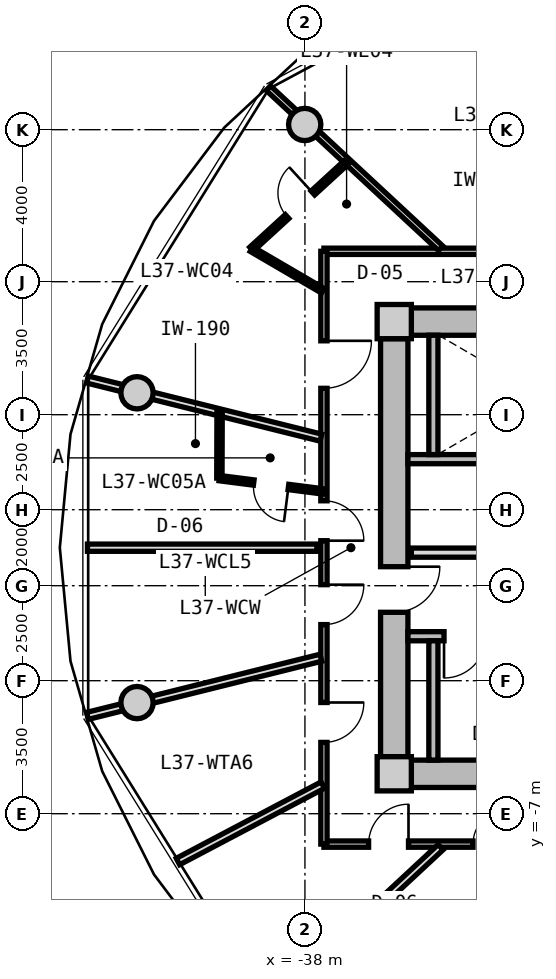
"""IFC4 building model, lengths in metres.
Left out: names, types, materials, properties, quantities, classifications, styles, units other than length and angle.
Written with IfcOpenShell. Run it as: python <this file> out.ifc"""

import sys

from ifc_helpers import new_model, si_unit, direction, frame, frame_2d, origin, origin_2d, place, context, subcontext, project, spatial, rectangle, circle, extrude, source, transform, mapped, element, fill, save


model = new_model("IFC4")
c1 = context("Model", 3, precision=1e-05, world=origin(), true_north=direction((0.0, 1.0)))
c2 = subcontext(c1, "Body", "Model", "MODEL_VIEW")
j1 = project(units=[si_unit("LENGTHUNIT", "METRE"), si_unit("PLANEANGLEUNIT", "RADIAN")], contexts=[c1])
p1 = place(None, origin())
s1 = spatial("IfcSite", under=j1, at=p1, CompositionType="ELEMENT")
p2 = place(p1, origin())
s2 = spatial("IfcBuilding", under=s1, at=p2, CompositionType="ELEMENT")
p3 = place(p2, frame((0.0, 0.0, 120.65)))
s3 = spatial("IfcBuildingStorey", under=s2, at=p3, CompositionType="ELEMENT", Elevation=120.65)
m1 = source(origin(), c2, "Body", "SweptSolid", [
    extrude(rectangle(XDim=0.9, YDim=0.9, at=origin_2d()), origin(), (0.0, 0.0, 1.0), 3.05),
])
for number, where, z_axis, x_axis in (
    (1, (-35.65, -5.95, 0.0), (0.0, 0.0, 1.0), (1.0, 0.0, 0.0)),
    (2, (-35.65, 5.95, 0.0), (0.0, 0.0, 1.0), (1.0, 0.0, 0.0)),
):
    element("IfcColumn", number, at=place(p3, frame(where, z_axis=z_axis, x_axis=x_axis)), inside=s3, PredefinedType="COLUMN", context=c2, shape_type="MappedRepresentation", body=[
        mapped(m1, transform((0.0, 0.0, 0.0), x_axis=(1.0, 0.0, 0.0), y_axis=(0.0, 1.0, 0.0), z_axis=(0.0, 0.0, 1.0), scale=1.0)),
    ])
m2 = source(origin(), c2, "Body", "SweptSolid", [
    extrude(rectangle(XDim=14.4, YDim=0.72, at=frame_2d((7.2, 0.0))), origin(), (0.0, 0.0, 1.0), 2.79),
])
for number, where, z_axis, x_axis in (
    (3, (-35.2, 5.95, 0.0), (0.0, 0.0, 1.0), (1.0, 0.0, 0.0)),
    (4, (-20.8, -5.95, 0.0), (0.0, 0.0, 1.0), (-1.0, 0.0, 0.0)),
):
    element("IfcWall", number, at=place(p3, frame(where, z_axis=z_axis, x_axis=x_axis)), inside=s3, PredefinedType="SHEAR", context=c2, shape_type="MappedRepresentation", body=[
        mapped(m2, transform((0.0, 0.0, 0.0), x_axis=(1.0, 0.0, 0.0), y_axis=(0.0, 1.0, 0.0), z_axis=(0.0, 0.0, 1.0), scale=1.0)),
    ])
m3 = source(origin(), c2, "Body", "SweptSolid", [
    extrude(rectangle(XDim=11.0, YDim=0.72, at=frame_2d((5.5, 0.0))), origin(), (0.0, 0.0, 1.0), 2.79),
])
p4 = place(p3, frame((-35.65, -5.5, 0.0), z_axis=(0.0, 0.0, 1.0), x_axis=(0.0, 1.0, 0.0)))
e5 = element("IfcWall", 5, at=p4, inside=s3, PredefinedType="SHEAR", context=c2, shape_type="MappedRepresentation", body=[
    mapped(m3, transform((0.0, 0.0, 0.0), x_axis=(1.0, 0.0, 0.0), y_axis=(0.0, 1.0, 0.0), z_axis=(0.0, 0.0, 1.0), scale=1.0)),
])
p5 = place(p4, frame((3.8, 0.0, 0.0)))
e6 = element("IfcOpeningElement", 6, at=p5, cuts=e5, PredefinedType="OPENING", context=c2, shape_type="SweptSolid", body=[
    extrude(rectangle(XDim=1.2, YDim=2.15, at=frame_2d((0.6, 1.075))), frame((0.0, 0.37, 0.0), z_axis=(0.0, -1.0, 0.0), x_axis=(1.0, 0.0, 0.0)), (0.0, 0.0, 1.0), 0.74),
])
m4 = source(origin(), c2, "Body", "SweptSolid", [
    extrude(circle(Radius=0.425, at=origin_2d()), origin(), (0.0, 0.0, 1.0), 3.05),
])
for number, where, z_axis, x_axis in (
    (7, (-38.006, 11.137, 0.0), (0.0, 0.0, 1.0), (1.0, 0.0, 0.0)),
    (8, (-42.419, 4.076, 0.0), (0.0, 0.0, 1.0), (1.0, 0.0, 0.0)),
    (9, (-42.419, -4.076, 0.0), (0.0, 0.0, 1.0), (1.0, 0.0, 0.0)),
):
    element("IfcColumn", number, at=place(p3, frame(where, z_axis=z_axis, x_axis=x_axis)), inside=s3, PredefinedType="COLUMN", context=c2, shape_type="MappedRepresentation", body=[
        mapped(m4, transform((0.0, 0.0, 0.0), x_axis=(1.0, 0.0, 0.0), y_axis=(0.0, 1.0, 0.0), z_axis=(0.0, 0.0, 1.0), scale=1.0)),
    ])
m5 = source(origin(), c2, "Body", "SweptSolid", [
    extrude(rectangle(XDim=7.83, YDim=0.24, at=frame_2d((3.915, 0.0))), origin(), (0.0, 0.0, 1.0), 2.79),
])
p6 = place(p3, frame((-35.29, 2.33, 0.0), z_axis=(0.0, 0.0, 1.0), x_axis=(1.0, 0.0, 0.0)))
e10 = element("IfcWall", 10, at=p6, inside=s3, PredefinedType="PARTITIONING", context=c2, shape_type="MappedRepresentation", body=[
    mapped(m5, transform((0.0, 0.0, 0.0), x_axis=(1.0, 0.0, 0.0), y_axis=(0.0, 1.0, 0.0), z_axis=(0.0, 0.0, 1.0), scale=1.0)),
])
m6 = source(origin(), c2, "Body", "SweptSolid", [
    extrude(rectangle(XDim=3.14, YDim=0.24, at=frame_2d((1.57, 0.0))), origin(), (0.0, 0.0, 1.0), 2.79),
])
p7 = place(p3, frame((-34.62, 2.45, 0.0), z_axis=(0.0, 0.0, 1.0), x_axis=(0.0, 1.0, 0.0)))
e11 = element("IfcWall", 11, at=p7, inside=s3, PredefinedType="PARTITIONING", context=c2, shape_type="MappedRepresentation", body=[
    mapped(m6, transform((0.0, 0.0, 0.0), x_axis=(1.0, 0.0, 0.0), y_axis=(0.0, 1.0, 0.0), z_axis=(0.0, 0.0, 1.0), scale=1.0)),
])
p8 = place(p3, frame((-35.29, -2.33, 0.0), z_axis=(0.0, 0.0, 1.0), x_axis=(1.0, 0.0, 0.0)))
e12 = element("IfcWall", 12, at=p8, inside=s3, PredefinedType="PARTITIONING", context=c2, shape_type="MappedRepresentation", body=[
    mapped(m5, transform((0.0, 0.0, 0.0), x_axis=(1.0, 0.0, 0.0), y_axis=(0.0, 1.0, 0.0), z_axis=(0.0, 0.0, 1.0), scale=1.0)),
])
p9 = place(p8, frame((0.95, 0.0, 0.0)))
e13 = element("IfcOpeningElement", 13, at=p9, cuts=e12, PredefinedType="OPENING", context=c2, shape_type="SweptSolid", body=[
    extrude(rectangle(XDim=1.1, YDim=2.15, at=frame_2d((0.55, 1.075))), frame((0.0, 0.13, 0.0), z_axis=(0.0, -1.0, 0.0), x_axis=(1.0, 0.0, 0.0)), (0.0, 0.0, 1.0), 0.26),
])
p10 = place(p3, frame((-34.62, -5.59, 0.0), z_axis=(0.0, 0.0, 1.0), x_axis=(0.0, 1.0, 0.0)))
e14 = element("IfcWall", 14, at=p10, inside=s3, PredefinedType="PARTITIONING", context=c2, shape_type="MappedRepresentation", body=[
    mapped(m6, transform((0.0, 0.0, 0.0), x_axis=(1.0, 0.0, 0.0), y_axis=(0.0, 1.0, 0.0), z_axis=(0.0, 0.0, 1.0), scale=1.0)),
])
m7 = source(origin(), c2, "Body", "SweptSolid", [
    extrude(rectangle(XDim=7.62, YDim=0.24, at=frame_2d((3.81, 0.0))), origin(), (0.0, 0.0, 1.0), 2.775),
])
p11 = place(p3, frame((-35.2, -0.13, 0.0), z_axis=(0.0, 0.0, 1.0), x_axis=(1.0, 0.0, 0.0)))
e15 = element("IfcWall", 15, at=p11, inside=s3, PredefinedType="PARTITIONING", context=c2, shape_type="MappedRepresentation", body=[
    mapped(m7, transform((0.0, 0.0, 0.0), x_axis=(1.0, 0.0, 0.0), y_axis=(0.0, 1.0, 0.0), z_axis=(0.0, 0.0, 1.0), scale=1.0)),
])
p12 = place(p11, frame((6.22, 0.0, 0.0)))
e16 = element("IfcOpeningElement", 16, at=p12, cuts=e15, PredefinedType="OPENING", context=c2, shape_type="SweptSolid", body=[
    extrude(rectangle(XDim=1.0, YDim=2.1, at=frame_2d((0.5, 1.05))), frame((0.0, 0.13, 0.0), z_axis=(0.0, -1.0, 0.0), x_axis=(1.0, 0.0, 0.0)), (0.0, 0.0, 1.0), 0.26),
])
p13 = place(p11, frame((2.4, 0.0, 0.0)))
e17 = element("IfcOpeningElement", 17, at=p13, cuts=e15, PredefinedType="OPENING", context=c2, shape_type="SweptSolid", body=[
    extrude(rectangle(XDim=1.0, YDim=2.1, at=frame_2d((0.5, 1.05))), frame((0.0, 0.13, 0.0), z_axis=(0.0, -1.0, 0.0), x_axis=(1.0, 0.0, 0.0)), (0.0, 0.0, 1.0), 0.26),
])
m8 = source(origin(), c2, "Body", "SweptSolid", [
    extrude(rectangle(XDim=8.6, YDim=0.165, at=frame_2d((4.3, 0.0))), origin(), (0.0, 0.0, 1.0), 2.775),
])
p14 = place(p3, frame((-37.5, 7.8, 0.0), z_axis=(0.0, 0.0, 1.0), x_axis=(1.0, 0.0, 0.0)))
e18 = element("IfcWall", 18, at=p14, inside=s3, PredefinedType="PARTITIONING", context=c2, shape_type="MappedRepresentation", body=[
    mapped(m8, transform((0.0, 0.0, 0.0), x_axis=(1.0, 0.0, 0.0), y_axis=(0.0, 1.0, 0.0), z_axis=(0.0, 0.0, 1.0), scale=1.0)),
])
m9 = source(origin(), c2, "Body", "SweptSolid", [
    extrude(rectangle(XDim=9.234, YDim=0.165, at=frame_2d((4.617, 0.0))), origin(), (0.0, 0.0, 1.0), 2.775),
])
p15 = place(p3, frame((-28.266, -7.8, 0.0), z_axis=(0.0, 0.0, 1.0), x_axis=(-1.0, 0.0, 0.0)))
e19 = element("IfcWall", 19, at=p15, inside=s3, PredefinedType="PARTITIONING", context=c2, shape_type="MappedRepresentation", body=[
    mapped(m9, transform((0.0, 0.0, 0.0), x_axis=(1.0, 0.0, 0.0), y_axis=(0.0, 1.0, 0.0), z_axis=(0.0, 0.0, 1.0), scale=1.0)),
])
p16 = place(p15, frame((7.009, 0.0, 0.0)))
e20 = element("IfcOpeningElement", 20, at=p16, cuts=e19, PredefinedType="OPENING", context=c2, shape_type="SweptSolid", body=[
    extrude(rectangle(XDim=1.05, YDim=2.15, at=frame_2d((0.525, 1.075))), frame((0.0, 0.093, 0.0), z_axis=(0.0, -1.0, 0.0), x_axis=(1.0, 0.0, 0.0)), (0.0, 0.0, 1.0), 0.185),
])
p17 = place(p15, frame((4.392, 0.0, 0.0)))
e21 = element("IfcOpeningElement", 21, at=p17, cuts=e19, PredefinedType="OPENING", context=c2, shape_type="SweptSolid", body=[
    extrude(rectangle(XDim=0.92, YDim=2.1, at=frame_2d((0.46, 1.05))), frame((0.0, 0.093, 0.0), z_axis=(0.0, -1.0, 0.0), x_axis=(1.0, 0.0, 0.0)), (0.0, 0.0, 1.0), 0.185),
])
p18 = place(p15, frame((1.408, 0.0, 0.0)))
e22 = element("IfcOpeningElement", 22, at=p18, cuts=e19, PredefinedType="OPENING", context=c2, shape_type="SweptSolid", body=[
    extrude(rectangle(XDim=0.92, YDim=2.1, at=frame_2d((0.46, 1.05))), frame((0.0, 0.093, 0.0), z_axis=(0.0, -1.0, 0.0), x_axis=(1.0, 0.0, 0.0)), (0.0, 0.0, 1.0), 0.185),
])
m10 = source(origin(), c2, "Body", "SweptSolid", [
    extrude(rectangle(XDim=15.6, YDim=0.165, at=frame_2d((7.8, 0.0))), origin(), (0.0, 0.0, 1.0), 2.775),
])
p19 = place(p3, frame((-37.5, -7.8, 0.0), z_axis=(0.0, 0.0, 1.0), x_axis=(0.0, 1.0, 0.0)))
e23 = element("IfcWall", 23, at=p19, inside=s3, PredefinedType="PARTITIONING", context=c2, shape_type="MappedRepresentation", body=[
    mapped(m10, transform((0.0, 0.0, 0.0), x_axis=(1.0, 0.0, 0.0), y_axis=(0.0, 1.0, 0.0), z_axis=(0.0, 0.0, 1.0), scale=1.0)),
])
p20 = place(p19, frame((11.994, 0.0, 0.0)))
e24 = element("IfcOpeningElement", 24, at=p20, cuts=e23, PredefinedType="OPENING", context=c2, shape_type="SweptSolid", body=[
    extrude(rectangle(XDim=1.25, YDim=2.2, at=frame_2d((0.625, 1.1))), frame((0.0, 0.093, 0.0), z_axis=(0.0, -1.0, 0.0), x_axis=(1.0, 0.0, 0.0)), (0.0, 0.0, 1.0), 0.185),
])
p21 = place(p19, frame((7.984, 0.0, 0.0)))
e25 = element("IfcOpeningElement", 25, at=p21, cuts=e23, PredefinedType="OPENING", context=c2, shape_type="SweptSolid", body=[
    extrude(rectangle(XDim=1.05, YDim=2.15, at=frame_2d((0.525, 1.075))), frame((0.0, 0.093, 0.0), z_axis=(0.0, -1.0, 0.0), x_axis=(1.0, 0.0, 0.0)), (0.0, 0.0, 1.0), 0.185),
])
p22 = place(p19, frame((5.777, 0.0, 0.0)))
e26 = element("IfcOpeningElement", 26, at=p22, cuts=e23, PredefinedType="OPENING", context=c2, shape_type="SweptSolid", body=[
    extrude(rectangle(XDim=1.05, YDim=2.15, at=frame_2d((0.525, 1.075))), frame((0.0, 0.093, 0.0), z_axis=(0.0, -1.0, 0.0), x_axis=(1.0, 0.0, 0.0)), (0.0, 0.0, 1.0), 0.185),
])
p23 = place(p19, frame((2.676, 0.0, 0.0)))
e27 = element("IfcOpeningElement", 27, at=p23, cuts=e23, PredefinedType="OPENING", context=c2, shape_type="SweptSolid", body=[
    extrude(rectangle(XDim=1.05, YDim=2.15, at=frame_2d((0.525, 1.075))), frame((0.0, 0.093, 0.0), z_axis=(0.0, -1.0, 0.0), x_axis=(1.0, 0.0, 0.0)), (0.0, 0.0, 1.0), 0.185),
])
m11 = source(origin(), c2, "Body", "SweptSolid", [
    extrude(rectangle(XDim=6.187, YDim=0.165, at=frame_2d((3.093, 0.0))), origin(), (0.0, 0.0, 1.0), 2.275),
])
p24 = place(p3, frame((-34.429, 7.88, 0.0), z_axis=(0.0, 0.0, 1.0), x_axis=(-0.732501077882, 0.680765870841, 0.0)))
e28 = element("IfcWall", 28, at=p24, inside=s3, PredefinedType="PARTITIONING", context=c2, shape_type="MappedRepresentation", body=[
    mapped(m11, transform((0.0, 0.0, 0.0), x_axis=(1.0, 0.0, 0.0), y_axis=(0.0, 1.0, 0.0), z_axis=(0.0, 0.0, 1.0), scale=1.0)),
])
m12 = source(origin(), c2, "Body", "SweptSolid", [
    extrude(rectangle(XDim=6.331, YDim=0.19, at=frame_2d((3.165, 0.0))), origin(), (0.0, 0.0, 1.0), 2.275),
])
p25 = place(p3, frame((-37.58, 2.896, 0.0), z_axis=(0.0, 0.0, 1.0), x_axis=(-0.97036440661, 0.241646267062, 0.0)))
e29 = element("IfcWall", 29, at=p25, inside=s3, PredefinedType="PARTITIONING", context=c2, shape_type="MappedRepresentation", body=[
    mapped(m12, transform((0.0, 0.0, 0.0), x_axis=(1.0, 0.0, 0.0), y_axis=(0.0, 1.0, 0.0), z_axis=(0.0, 0.0, 1.0), scale=1.0)),
])
m13 = source(origin(), c2, "Body", "SweptSolid", [
    extrude(rectangle(XDim=2.172, YDim=0.14, at=frame_2d((1.086, 0.0))), origin(), (0.0, 0.0, 1.0), 2.775),
])
p26 = place(p3, frame((-37.53, 6.762, 0.0), z_axis=(0.0, 0.0, 1.0), x_axis=(-0.863562702562, 0.504241468688, 0.0)))
e30 = element("IfcWall", 30, at=p26, inside=s3, PredefinedType="PARTITIONING", context=c2, shape_type="MappedRepresentation", body=[
    mapped(m13, transform((0.0, 0.0, 0.0), x_axis=(1.0, 0.0, 0.0), y_axis=(0.0, 1.0, 0.0), z_axis=(0.0, 0.0, 1.0), scale=1.0)),
])
m14 = source(origin(), c2, "Body", "SweptSolid", [
    extrude(rectangle(XDim=3.457, YDim=0.14, at=frame_2d((1.729, 0.0))), origin(), (0.0, 0.0, 1.0), 2.775),
])
p27 = place(p3, frame((-39.405, 7.857, 0.0), z_axis=(0.0, 0.0, 1.0), x_axis=(0.737567375492, 0.675273549467, 0.0)))
e31 = element("IfcWall", 31, at=p27, inside=s3, PredefinedType="PARTITIONING", context=c2, shape_type="MappedRepresentation", body=[
    mapped(m14, transform((0.0, 0.0, 0.0), x_axis=(1.0, 0.0, 0.0), y_axis=(0.0, 1.0, 0.0), z_axis=(0.0, 0.0, 1.0), scale=1.0)),
])
p28 = place(p27, frame((1.268, 0.0, 0.0)))
e32 = element("IfcOpeningElement", 32, at=p28, cuts=e31, PredefinedType="OPENING", context=c2, shape_type="SweptSolid", body=[
    extrude(rectangle(XDim=0.92, YDim=2.1, at=frame_2d((0.46, 1.05))), frame((0.0, 0.08, 0.0), z_axis=(0.0, -1.0, 0.0), x_axis=(1.0, 0.0, 0.0)), (0.0, 0.0, 1.0), 0.16),
])
p29 = place(p3, frame((-37.58, -2.896, 0.0), z_axis=(0.0, 0.0, 1.0), x_axis=(-0.97036440661, -0.241646267062, 0.0)))
e33 = element("IfcWall", 33, at=p29, inside=s3, PredefinedType="PARTITIONING", context=c2, shape_type="MappedRepresentation", body=[
    mapped(m12, transform((0.0, 0.0, 0.0), x_axis=(1.0, 0.0, 0.0), y_axis=(0.0, 1.0, 0.0), z_axis=(0.0, 0.0, 1.0), scale=1.0)),
])
m15 = source(origin(), c2, "Body", "SweptSolid", [
    extrude(rectangle(XDim=6.039, YDim=0.19, at=frame_2d((3.019, 0.0))), origin(), (0.0, 0.0, 1.0), 2.775),
])
p30 = place(p3, frame((-37.685, 0.0, 0.0), z_axis=(0.0, 0.0, 1.0), x_axis=(-1.0, 0.0, 0.0)))
e34 = element("IfcWall", 34, at=p30, inside=s3, PredefinedType="PARTITIONING", context=c2, shape_type="MappedRepresentation", body=[
    mapped(m15, transform((0.0, 0.0, 0.0), x_axis=(1.0, 0.0, 0.0), y_axis=(0.0, 1.0, 0.0), z_axis=(0.0, 0.0, 1.0), scale=1.0)),
])
m16 = source(origin(), c2, "Body", "SweptSolid", [
    extrude(rectangle(XDim=2.744, YDim=0.14, at=frame_2d((1.372, 0.0))), origin(), (0.0, 0.0, 1.0), 2.775),
])
p31 = place(p3, frame((-37.53, 1.482, 0.0), z_axis=(0.0, 0.0, 1.0), x_axis=(-0.991916450239, 0.126892693823, 0.0)))
e35 = element("IfcWall", 35, at=p31, inside=s3, PredefinedType="PARTITIONING", context=c2, shape_type="MappedRepresentation", body=[
    mapped(m16, transform((0.0, 0.0, 0.0), x_axis=(1.0, 0.0, 0.0), y_axis=(0.0, 1.0, 0.0), z_axis=(0.0, 0.0, 1.0), scale=1.0)),
])
p32 = place(p31, frame((0.912, 0.0, 0.0)))
e36 = element("IfcOpeningElement", 36, at=p32, cuts=e35, PredefinedType="OPENING", context=c2, shape_type="SweptSolid", body=[
    extrude(rectangle(XDim=0.92, YDim=2.1, at=frame_2d((0.46, 1.05))), frame((0.0, 0.08, 0.0), z_axis=(0.0, -1.0, 0.0), x_axis=(1.0, 0.0, 0.0)), (0.0, 0.0, 1.0), 0.16),
])
m17 = source(origin(), c2, "Body", "SweptSolid", [
    extrude(rectangle(XDim=1.749, YDim=0.14, at=frame_2d((0.875, 0.0))), origin(), (0.0, 0.0, 1.0), 2.775),
])
p33 = place(p3, frame((-40.251, 1.831, 0.0), z_axis=(0.0, 0.0, 1.0), x_axis=(0.003350064953, 0.999994388517, 0.0)))
e37 = element("IfcWall", 37, at=p33, inside=s3, PredefinedType="PARTITIONING", context=c2, shape_type="MappedRepresentation", body=[
    mapped(m17, transform((0.0, 0.0, 0.0), x_axis=(1.0, 0.0, 0.0), y_axis=(0.0, 1.0, 0.0), z_axis=(0.0, 0.0, 1.0), scale=1.0)),
])
m18 = source(origin(), c2, "Body", "SweptSolid", [
    extrude(rectangle(XDim=6.187, YDim=0.19, at=frame_2d((3.093, 0.0))), origin(), (0.0, 0.0, 1.0), 2.275),
])
p34 = place(p3, frame((-34.429, -7.88, 0.0), z_axis=(0.0, 0.0, 1.0), x_axis=(-0.732501077882, -0.680765870841, 0.0)))
e38 = element("IfcWall", 38, at=p34, inside=s3, PredefinedType="PARTITIONING", context=c2, shape_type="MappedRepresentation", body=[
    mapped(m18, transform((0.0, 0.0, 0.0), x_axis=(1.0, 0.0, 0.0), y_axis=(0.0, 1.0, 0.0), z_axis=(0.0, 0.0, 1.0), scale=1.0)),
])
m19 = source(origin(), c2, "Body", "SweptSolid", [
    extrude(rectangle(XDim=4.31, YDim=0.19, at=frame_2d((2.155, 0.0))), origin(), (0.0, 0.0, 1.0), 2.775),
])
p35 = place(p3, frame((-37.53, -6.248, 0.0), z_axis=(0.0, 0.0, 1.0), x_axis=(-0.884459441503, -0.466617076773, 0.0)))
e39 = element("IfcWall", 39, at=p35, inside=s3, PredefinedType="PARTITIONING", context=c2, shape_type="MappedRepresentation", body=[
    mapped(m19, transform((0.0, 0.0, 0.0), x_axis=(1.0, 0.0, 0.0), y_axis=(0.0, 1.0, 0.0), z_axis=(0.0, 0.0, 1.0), scale=1.0)),
])
m20 = source(origin(), c2, "Body", "SweptSolid", [
    extrude(rectangle(XDim=7.243, YDim=0.14, at=frame_2d((3.621, 0.0))), origin(), (0.0, 0.0, 1.0), 2.775),
])
p36 = place(p3, frame((-31.774, -7.83, 0.0), z_axis=(0.0, 0.0, 1.0), x_axis=(-0.605111472002, -0.796140757939, 0.0)))
e40 = element("IfcWall", 40, at=p36, inside=s3, PredefinedType="PARTITIONING", context=c2, shape_type="MappedRepresentation", body=[
    mapped(m20, transform((0.0, 0.0, 0.0), x_axis=(1.0, 0.0, 0.0), y_axis=(0.0, 1.0, 0.0), z_axis=(0.0, 0.0, 1.0), scale=1.0)),
])
m21 = source(origin(), c2, "Body", "SweptSolid", [
    extrude(rectangle(XDim=1.1, YDim=2.15, at=frame_2d((0.55, 1.075))), frame((0.0, 0.025, 0.0), z_axis=(0.0, -1.0, 0.0), x_axis=(1.0, 0.0, 0.0)), (0.0, 0.0, 1.0), 0.05),
])
p37 = place(p9, frame((1.1, 0.0, 0.0), z_axis=(0.0, 0.0, 1.0), x_axis=(-1.0, 0.0, 0.0)))
e41 = element("IfcDoor", 41, at=p37, inside=s3, OperationType="SINGLE_SWING_RIGHT", PredefinedType="DOOR", context=c2, shape_type="MappedRepresentation", body=[
    mapped(m21, transform((0.0, 0.0, 0.0), x_axis=(1.0, 0.0, 0.0), y_axis=(0.0, 1.0, 0.0), z_axis=(0.0, 0.0, 1.0), scale=1.0)),
])
fill(e13, e41)
m22 = source(origin(), c2, "Body", "SweptSolid", [
    extrude(rectangle(XDim=1.2, YDim=2.15, at=frame_2d((0.6, 1.075))), frame((0.0, 0.025, 0.0), z_axis=(0.0, -1.0, 0.0), x_axis=(1.0, 0.0, 0.0)), (0.0, 0.0, 1.0), 0.05),
])
p38 = place(p5, frame((1.2, 0.0, 0.0), z_axis=(0.0, 0.0, 1.0), x_axis=(-1.0, 0.0, 0.0)))
e42 = element("IfcDoor", 42, at=p38, inside=s3, OperationType="SINGLE_SWING_LEFT", PredefinedType="DOOR", context=c2, shape_type="MappedRepresentation", body=[
    mapped(m22, transform((0.0, 0.0, 0.0), x_axis=(1.0, 0.0, 0.0), y_axis=(0.0, 1.0, 0.0), z_axis=(0.0, 0.0, 1.0), scale=1.0)),
])
fill(e6, e42)
m23 = source(origin(), c2, "Body", "SweptSolid", [
    extrude(rectangle(XDim=1.25, YDim=2.2, at=frame_2d((0.625, 1.1))), frame((0.0, 0.025, 0.0), z_axis=(0.0, -1.0, 0.0), x_axis=(1.0, 0.0, 0.0)), (0.0, 0.0, 1.0), 0.05),
])
p39 = place(p20, frame((1.25, 0.0, 0.0), z_axis=(0.0, 0.0, 1.0), x_axis=(-1.0, 0.0, 0.0)))
e43 = element("IfcDoor", 43, at=p39, inside=s3, OperationType="SINGLE_SWING_LEFT", PredefinedType="DOOR", context=c2, shape_type="MappedRepresentation", body=[
    mapped(m23, transform((0.0, 0.0, 0.0), x_axis=(1.0, 0.0, 0.0), y_axis=(0.0, 1.0, 0.0), z_axis=(0.0, 0.0, 1.0), scale=1.0)),
])
fill(e24, e43)
m24 = source(origin(), c2, "Body", "SweptSolid", [
    extrude(rectangle(XDim=0.92, YDim=2.1, at=frame_2d((0.46, 1.05))), frame((0.0, 0.025, 0.0), z_axis=(0.0, -1.0, 0.0), x_axis=(1.0, 0.0, 0.0)), (0.0, 0.0, 1.0), 0.05),
])
p40 = place(p28, origin())
e44 = element("IfcDoor", 44, at=p40, inside=s3, OperationType="SINGLE_SWING_RIGHT", PredefinedType="DOOR", context=c2, shape_type="MappedRepresentation", body=[
    mapped(m24, transform((0.0, 0.0, 0.0), x_axis=(1.0, 0.0, 0.0), y_axis=(0.0, 1.0, 0.0), z_axis=(0.0, 0.0, 1.0), scale=1.0)),
])
fill(e32, e44)
m25 = source(origin(), c2, "Body", "SweptSolid", [
    extrude(rectangle(XDim=1.05, YDim=2.15, at=frame_2d((0.525, 1.075))), frame((0.0, 0.025, 0.0), z_axis=(0.0, -1.0, 0.0), x_axis=(1.0, 0.0, 0.0)), (0.0, 0.0, 1.0), 0.05),
])
p41 = place(p21, frame((1.05, 0.0, 0.0), z_axis=(0.0, 0.0, 1.0), x_axis=(-1.0, 0.0, 0.0)))
e45 = element("IfcDoor", 45, at=p41, inside=s3, OperationType="SINGLE_SWING_RIGHT", PredefinedType="DOOR", context=c2, shape_type="MappedRepresentation", body=[
    mapped(m25, transform((0.0, 0.0, 0.0), x_axis=(1.0, 0.0, 0.0), y_axis=(0.0, 1.0, 0.0), z_axis=(0.0, 0.0, 1.0), scale=1.0)),
])
fill(e25, e45)
p42 = place(p32, origin())
e46 = element("IfcDoor", 46, at=p42, inside=s3, OperationType="SINGLE_SWING_LEFT", PredefinedType="DOOR", context=c2, shape_type="MappedRepresentation", body=[
    mapped(m24, transform((0.0, 0.0, 0.0), x_axis=(1.0, 0.0, 0.0), y_axis=(0.0, 1.0, 0.0), z_axis=(0.0, 0.0, 1.0), scale=1.0)),
])
fill(e36, e46)
p43 = place(p22, frame((1.05, 0.0, 0.0), z_axis=(0.0, 0.0, 1.0), x_axis=(-1.0, 0.0, 0.0)))
e47 = element("IfcDoor", 47, at=p43, inside=s3, OperationType="SINGLE_SWING_LEFT", PredefinedType="DOOR", context=c2, shape_type="MappedRepresentation", body=[
    mapped(m25, transform((0.0, 0.0, 0.0), x_axis=(1.0, 0.0, 0.0), y_axis=(0.0, 1.0, 0.0), z_axis=(0.0, 0.0, 1.0), scale=1.0)),
])
fill(e26, e47)
p44 = place(p23, frame((1.05, 0.0, 0.0), z_axis=(0.0, 0.0, 1.0), x_axis=(-1.0, 0.0, 0.0)))
e48 = element("IfcDoor", 48, at=p44, inside=s3, OperationType="SINGLE_SWING_LEFT", PredefinedType="DOOR", context=c2, shape_type="MappedRepresentation", body=[
    mapped(m25, transform((0.0, 0.0, 0.0), x_axis=(1.0, 0.0, 0.0), y_axis=(0.0, 1.0, 0.0), z_axis=(0.0, 0.0, 1.0), scale=1.0)),
])
fill(e27, e48)
p45 = place(p16, frame((1.05, 0.0, 0.0), z_axis=(0.0, 0.0, 1.0), x_axis=(-1.0, 0.0, 0.0)))
e49 = element("IfcDoor", 49, at=p45, inside=s3, OperationType="SINGLE_SWING_RIGHT", PredefinedType="DOOR", context=c2, shape_type="MappedRepresentation", body=[
    mapped(m25, transform((0.0, 0.0, 0.0), x_axis=(1.0, 0.0, 0.0), y_axis=(0.0, 1.0, 0.0), z_axis=(0.0, 0.0, 1.0), scale=1.0)),
])
fill(e20, e49)
p46 = place(p17, frame((0.92, 0.0, 0.0), z_axis=(0.0, 0.0, 1.0), x_axis=(-1.0, 0.0, 0.0)))
e50 = element("IfcDoor", 50, at=p46, inside=s3, OperationType="SINGLE_SWING_RIGHT", PredefinedType="DOOR", context=c2, shape_type="MappedRepresentation", body=[
    mapped(m24, transform((0.0, 0.0, 0.0), x_axis=(1.0, 0.0, 0.0), y_axis=(0.0, 1.0, 0.0), z_axis=(0.0, 0.0, 1.0), scale=1.0)),
])
fill(e21, e50)
save(model, sys.argv[1])
